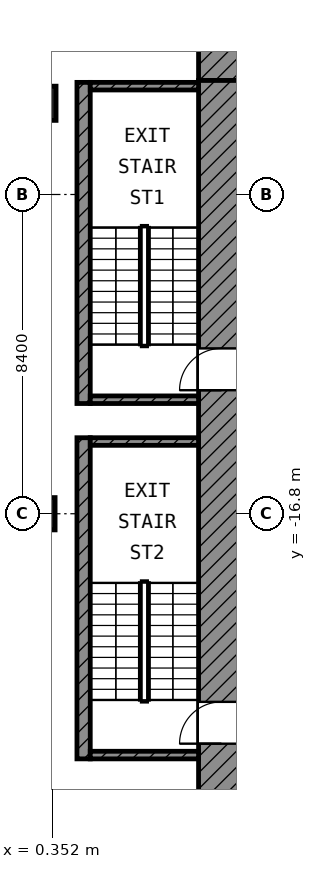
"""IFC4 building model, lengths in metres.
Left out: names, types, materials, properties, quantities, classifications, styles, units other than length and angle.
Written with IfcOpenShell. Run it as: python <this file> out.ifc"""

import sys

from ifc_helpers import new_model, si_unit, direction, frame, frame_2d, origin, origin_2d, place, context, subcontext, project, spatial, rectangle, extrude, element, fill, save


model = new_model("IFC4")
c1 = context("Model", 3, precision=1e-05, world=origin(), true_north=direction((0.0, 1.0)))
c2 = subcontext(c1, "Body", "Model", "MODEL_VIEW")
j1 = project(units=[si_unit("LENGTHUNIT", "METRE"), si_unit("PLANEANGLEUNIT", "RADIAN")], contexts=[c1])
p1 = place(None, origin())
s1 = spatial("IfcSite", under=j1, at=p1, CompositionType="ELEMENT")
p2 = place(p1, origin())
s2 = spatial("IfcBuilding", under=s1, at=p2, CompositionType="ELEMENT")
p3 = place(p2, frame((0.0, 0.0, 264.2)))
s3 = spatial("IfcBuildingStorey", under=s2, at=p3, CompositionType="ELEMENT", Elevation=264.2)
p4 = place(p3, frame((0.0, -6.0, 0.0), z_axis=(0.0, 0.0, 1.0), x_axis=(1.0, 0.0, 0.0)))
e1 = element("IfcColumn", 1, at=p4, inside=s3, PredefinedType="COLUMN", context=c2, shape_type="SweptSolid", body=[
    extrude(rectangle(XDim=0.9, YDim=0.9, at=origin_2d()), origin(), (0.0, 0.0, 1.0), 4.2),
])
p5 = place(p3, frame((0.0, -16.8, 0.0), z_axis=(0.0, 0.0, 1.0), x_axis=(1.0, 0.0, 0.0)))
e2 = element("IfcColumn", 2, at=p5, inside=s3, PredefinedType="COLUMN", context=c2, shape_type="SweptSolid", body=[
    extrude(rectangle(XDim=0.85, YDim=0.85, at=origin_2d()), origin(), (0.0, 0.0, 1.0), 4.2),
])
p6 = place(p3, frame((4.2, -4.8, 0.0), z_axis=(0.0, 0.0, 1.0), x_axis=(1.0, 0.0, 0.0)))
e3 = element("IfcWall", 3, at=p6, inside=s3, PredefinedType="SHEAR", context=c2, shape_type="SweptSolid", body=[
    extrude(rectangle(XDim=20.6, YDim=1.2, at=frame_2d((10.3, 0.0))), origin(), (0.0, 0.0, 1.0), 3.6),
])
p7 = place(p6, frame((1.95, 0.0, 0.0)))
e4 = element("IfcOpeningElement", 4, at=p7, cuts=e3, PredefinedType="OPENING", context=c2, shape_type="SweptSolid", body=[
    extrude(rectangle(XDim=1.1, YDim=2.1, at=frame_2d((0.55, 1.05))), frame((0.0, 0.61, 0.0), z_axis=(0.0, -1.0, 0.0), x_axis=(1.0, 0.0, 0.0)), (0.0, 0.0, 1.0), 1.22),
])
p8 = place(p6, frame((17.95, 0.0, 0.0)))
e5 = element("IfcOpeningElement", 5, at=p8, cuts=e3, PredefinedType="OPENING", context=c2, shape_type="SweptSolid", body=[
    extrude(rectangle(XDim=1.1, YDim=2.1, at=frame_2d((0.55, 1.05))), frame((0.0, 0.61, 0.0), z_axis=(0.0, -1.0, 0.0), x_axis=(1.0, 0.0, 0.0)), (0.0, 0.0, 1.0), 1.22),
])
p9 = place(p3, frame((4.8, -24.8, 0.0), z_axis=(0.0, 0.0, 1.0), x_axis=(0.0, 1.0, 0.0)))
e6 = element("IfcWall", 6, at=p9, inside=s3, PredefinedType="SHEAR", context=c2, shape_type="SweptSolid", body=[
    extrude(rectangle(XDim=19.4, YDim=1.2, at=frame_2d((9.7, 0.0))), origin(), (0.0, 0.0, 1.0), 3.6),
])
p10 = place(p9, frame((11.25, 0.0, 0.0)))
e7 = element("IfcOpeningElement", 7, at=p10, cuts=e6, PredefinedType="OPENING", context=c2, shape_type="SweptSolid", body=[
    extrude(rectangle(XDim=1.1, YDim=2.1, at=frame_2d((0.55, 1.05))), frame((0.0, 0.61, 0.0), z_axis=(0.0, -1.0, 0.0), x_axis=(1.0, 0.0, 0.0)), (0.0, 0.0, 1.0), 1.22),
])
p11 = place(p9, frame((1.95, 0.0, 0.0)))
e8 = element("IfcOpeningElement", 8, at=p11, cuts=e6, PredefinedType="OPENING", context=c2, shape_type="SweptSolid", body=[
    extrude(rectangle(XDim=1.1, YDim=2.1, at=frame_2d((0.55, 1.05))), frame((0.0, 0.61, 0.0), z_axis=(0.0, -1.0, 0.0), x_axis=(1.0, 0.0, 0.0)), (0.0, 0.0, 1.0), 1.22),
])
p12 = place(p3, frame((1.175, -13.9, 0.0), z_axis=(0.0, 0.0, 1.0), x_axis=(0.0, 1.0, 0.0)))
e9 = element("IfcWall", 9, at=p12, inside=s3, PredefinedType="SHEAR", context=c2, shape_type="SweptSolid", body=[
    extrude(rectangle(XDim=8.45, YDim=0.35, at=frame_2d((4.225, 0.0))), origin(), (0.0, 0.0, 1.0), 3.6),
])
for number, where, z_axis, x_axis in (
    (10, (1.35, -5.55, 0.0), (0.0, 0.0, 1.0), (1.0, 0.0, 0.0)),
    (11, (1.35, -13.8, 0.0), (0.0, 0.0, 1.0), (1.0, 0.0, 0.0)),
):
    element("IfcWall", number, at=place(p3, frame(where, z_axis=z_axis, x_axis=x_axis)), inside=s3, PredefinedType="SHEAR", context=c2, shape_type="SweptSolid", body=[
        extrude(rectangle(XDim=2.85, YDim=0.2, at=frame_2d((1.425, 0.0))), origin(), (0.0, 0.0, 1.0), 3.6),
    ])
p13 = place(p3, frame((1.175, -23.25, 0.0), z_axis=(0.0, 0.0, 1.0), x_axis=(0.0, 1.0, 0.0)))
e12 = element("IfcWall", 12, at=p13, inside=s3, PredefinedType="SHEAR", context=c2, shape_type="SweptSolid", body=[
    extrude(rectangle(XDim=8.45, YDim=0.35, at=frame_2d((4.225, 0.0))), origin(), (0.0, 0.0, 1.0), 3.6),
])
for number, where, z_axis, x_axis in (
    (13, (1.35, -14.9, 0.0), (0.0, 0.0, 1.0), (1.0, 0.0, 0.0)),
    (14, (1.35, -23.15, 0.0), (0.0, 0.0, 1.0), (1.0, 0.0, 0.0)),
):
    element("IfcWall", number, at=place(p3, frame(where, z_axis=z_axis, x_axis=x_axis)), inside=s3, PredefinedType="SHEAR", context=c2, shape_type="SweptSolid", body=[
        extrude(rectangle(XDim=2.85, YDim=0.2, at=frame_2d((1.425, 0.0))), origin(), (0.0, 0.0, 1.0), 3.6),
    ])
p14 = place(p10, origin())
e15 = element("IfcDoor", 15, at=p14, inside=s3, OperationType="SINGLE_SWING_LEFT", PredefinedType="DOOR", context=c2, shape_type="SweptSolid", body=[
    extrude(rectangle(XDim=1.1, YDim=2.1, at=frame_2d((0.55, 1.05))), frame((0.0, 0.025, 0.0), z_axis=(0.0, -1.0, 0.0), x_axis=(1.0, 0.0, 0.0)), (0.0, 0.0, 1.0), 0.05),
])
fill(e7, e15)
p15 = place(p11, origin())
e16 = element("IfcDoor", 16, at=p15, inside=s3, OperationType="SINGLE_SWING_LEFT", PredefinedType="DOOR", context=c2, shape_type="SweptSolid", body=[
    extrude(rectangle(XDim=1.1, YDim=2.1, at=frame_2d((0.55, 1.05))), frame((0.0, 0.025, 0.0), z_axis=(0.0, -1.0, 0.0), x_axis=(1.0, 0.0, 0.0)), (0.0, 0.0, 1.0), 0.05),
])
fill(e8, e16)
save(model, sys.argv[1])
